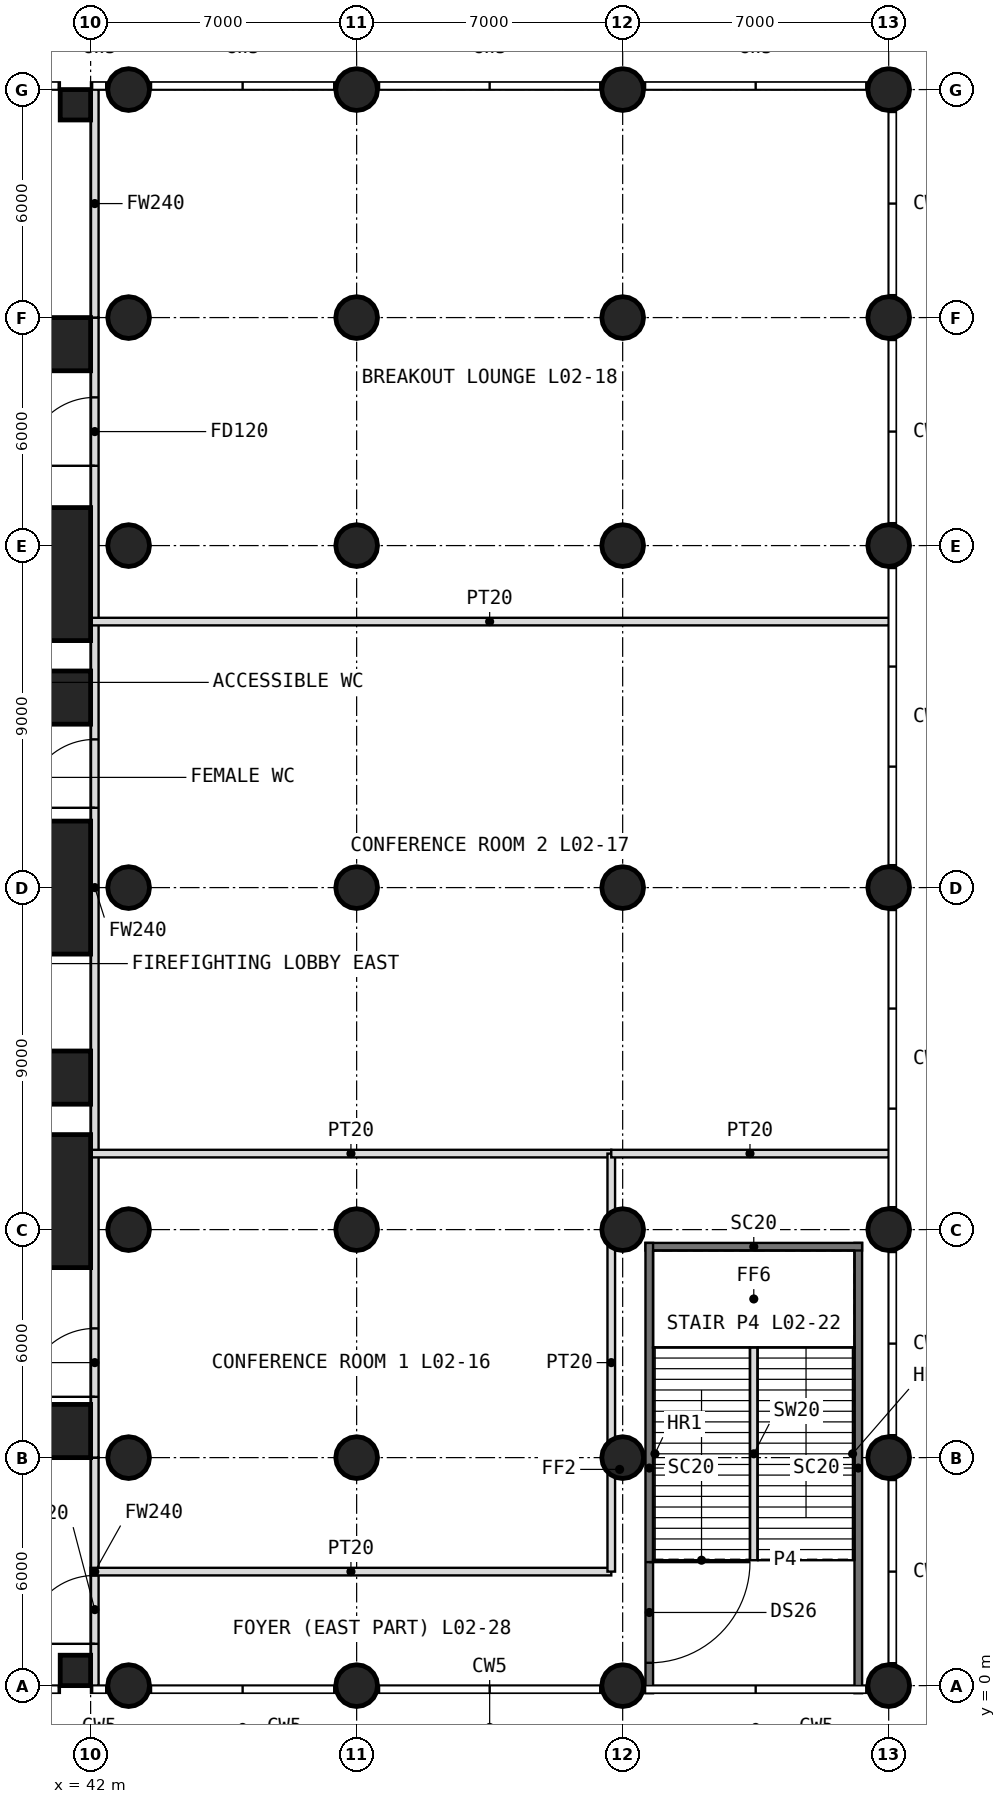
"""IFC4 building model, lengths in metres.
Left out: names, types, materials, properties, quantities, classifications, styles, units other than length and angle.
Written with IfcOpenShell. Run it as: python <this file> out.ifc"""

import sys

from ifc_helpers import new_model, si_unit, direction, frame, frame_2d, origin, origin_2d, place, context, subcontext, project, spatial, rectangle, circle, extrude, element, fill, save


model = new_model("IFC4")
c1 = context("Model", 3, precision=1e-05, world=origin(), true_north=direction((0.0, 1.0)))
c2 = subcontext(c1, "Body", "Model", "MODEL_VIEW")
j1 = project(units=[si_unit("LENGTHUNIT", "METRE"), si_unit("PLANEANGLEUNIT", "RADIAN")], contexts=[c1])
p1 = place(None, origin())
s1 = spatial("IfcSite", under=j1, at=p1, CompositionType="ELEMENT")
p2 = place(p1, origin())
s2 = spatial("IfcBuilding", under=s1, at=p2, CompositionType="ELEMENT")
p3 = place(p2, frame((0.0, 0.0, 11.0)))
s3 = spatial("IfcBuildingStorey", under=s2, at=p3, CompositionType="ELEMENT", Elevation=11.0)
p4 = place(p3, frame((41.6, 0.4, 0.0), z_axis=(0.0, 0.0, 1.0), x_axis=(1.0, 0.0, 0.0)))
e1 = element("IfcColumn", 1, at=p4, inside=s3, PredefinedType="COLUMN", context=c2, shape_type="SweptSolid", body=[
    extrude(rectangle(XDim=0.8, YDim=0.8, at=origin_2d()), origin(), (0.0, 0.0, 1.0), 7.0),
])
for number, where, z_axis, x_axis in (
    (2, (43.0, 0.0, 0.0), (0.0, 0.0, 1.0), (1.0, 0.0, 0.0)),
    (3, (49.0, 0.0, 0.0), (0.0, 0.0, 1.0), (1.0, 0.0, 0.0)),
    (4, (56.0, 0.0, 0.0), (0.0, 0.0, 1.0), (1.0, 0.0, 0.0)),
    (5, (63.0, 0.0, 0.0), (0.0, 0.0, 1.0), (1.0, 0.0, 0.0)),
):
    element("IfcColumn", number, at=place(p3, frame(where, z_axis=z_axis, x_axis=x_axis)), inside=s3, PredefinedType="COLUMN", context=c2, shape_type="SweptSolid", body=[
        extrude(circle(Radius=0.55, at=origin_2d()), origin(), (0.0, 0.0, 1.0), 7.0),
    ])
p5 = place(p3, frame((41.3, 6.7, 0.0), z_axis=(0.0, 0.0, 1.0), x_axis=(1.0, 0.0, 0.0)))
e6 = element("IfcColumn", 6, at=p5, inside=s3, PredefinedType="COLUMN", context=c2, shape_type="SweptSolid", body=[
    extrude(rectangle(XDim=1.4, YDim=1.4, at=origin_2d()), origin(), (0.0, 0.0, 1.0), 7.0),
])
for number, where, z_axis, x_axis in (
    (7, (43.0, 6.0, 0.0), (0.0, 0.0, 1.0), (1.0, 0.0, 0.0)),
    (8, (49.0, 6.0, 0.0), (0.0, 0.0, 1.0), (1.0, 0.0, 0.0)),
    (9, (56.0, 6.0, 0.0), (0.0, 0.0, 1.0), (1.0, 0.0, 0.0)),
    (10, (63.0, 6.0, 0.0), (0.0, 0.0, 1.0), (1.0, 0.0, 0.0)),
):
    element("IfcColumn", number, at=place(p3, frame(where, z_axis=z_axis, x_axis=x_axis)), inside=s3, PredefinedType="COLUMN", context=c2, shape_type="SweptSolid", body=[
        extrude(circle(Radius=0.55, at=origin_2d()), origin(), (0.0, 0.0, 1.0), 7.0),
    ])
p6 = place(p3, frame((40.25, 12.75, 0.0), z_axis=(0.0, 0.0, 1.0), x_axis=(1.0, 0.0, 0.0)))
e11 = element("IfcColumn", 11, at=p6, inside=s3, PredefinedType="COLUMN", context=c2, shape_type="SweptSolid", body=[
    extrude(rectangle(XDim=3.5, YDim=3.5, at=origin_2d()), origin(), (0.0, 0.0, 1.0), 7.0),
])
for number, where, z_axis, x_axis in (
    (12, (43.0, 12.0, 0.0), (0.0, 0.0, 1.0), (1.0, 0.0, 0.0)),
    (13, (49.0, 12.0, 0.0), (0.0, 0.0, 1.0), (1.0, 0.0, 0.0)),
    (14, (56.0, 12.0, 0.0), (0.0, 0.0, 1.0), (1.0, 0.0, 0.0)),
    (15, (63.0, 12.0, 0.0), (0.0, 0.0, 1.0), (1.0, 0.0, 0.0)),
):
    element("IfcColumn", number, at=place(p3, frame(where, z_axis=z_axis, x_axis=x_axis)), inside=s3, PredefinedType="COLUMN", context=c2, shape_type="SweptSolid", body=[
        extrude(circle(Radius=0.55, at=origin_2d()), origin(), (0.0, 0.0, 1.0), 7.0),
    ])
p7 = place(p3, frame((41.3, 16.0, 0.0), z_axis=(0.0, 0.0, 1.0), x_axis=(1.0, 0.0, 0.0)))
e16 = element("IfcColumn", 16, at=p7, inside=s3, PredefinedType="COLUMN", context=c2, shape_type="SweptSolid", body=[
    extrude(rectangle(XDim=1.4, YDim=1.4, at=origin_2d()), origin(), (0.0, 0.0, 1.0), 7.0),
])
p8 = place(p3, frame((40.25, 21.0, 0.0), z_axis=(0.0, 0.0, 1.0), x_axis=(1.0, 0.0, 0.0)))
e17 = element("IfcColumn", 17, at=p8, inside=s3, PredefinedType="COLUMN", context=c2, shape_type="SweptSolid", body=[
    extrude(rectangle(XDim=3.5, YDim=3.5, at=origin_2d()), origin(), (0.0, 0.0, 1.0), 7.0),
])
for number, where, z_axis, x_axis in (
    (18, (43.0, 21.0, 0.0), (0.0, 0.0, 1.0), (1.0, 0.0, 0.0)),
    (19, (49.0, 21.0, 0.0), (0.0, 0.0, 1.0), (1.0, 0.0, 0.0)),
    (20, (56.0, 21.0, 0.0), (0.0, 0.0, 1.0), (1.0, 0.0, 0.0)),
    (21, (63.0, 21.0, 0.0), (0.0, 0.0, 1.0), (1.0, 0.0, 0.0)),
):
    element("IfcColumn", number, at=place(p3, frame(where, z_axis=z_axis, x_axis=x_axis)), inside=s3, PredefinedType="COLUMN", context=c2, shape_type="SweptSolid", body=[
        extrude(circle(Radius=0.55, at=origin_2d()), origin(), (0.0, 0.0, 1.0), 7.0),
    ])
p9 = place(p3, frame((41.3, 26.0, 0.0), z_axis=(0.0, 0.0, 1.0), x_axis=(1.0, 0.0, 0.0)))
e22 = element("IfcColumn", 22, at=p9, inside=s3, PredefinedType="COLUMN", context=c2, shape_type="SweptSolid", body=[
    extrude(rectangle(XDim=1.4, YDim=1.4, at=origin_2d()), origin(), (0.0, 0.0, 1.0), 7.0),
])
for number, where, z_axis, x_axis in (
    (23, (43.0, 30.0, 0.0), (0.0, 0.0, 1.0), (1.0, 0.0, 0.0)),
    (24, (49.0, 30.0, 0.0), (0.0, 0.0, 1.0), (1.0, 0.0, 0.0)),
    (25, (56.0, 30.0, 0.0), (0.0, 0.0, 1.0), (1.0, 0.0, 0.0)),
    (26, (63.0, 30.0, 0.0), (0.0, 0.0, 1.0), (1.0, 0.0, 0.0)),
):
    element("IfcColumn", number, at=place(p3, frame(where, z_axis=z_axis, x_axis=x_axis)), inside=s3, PredefinedType="COLUMN", context=c2, shape_type="SweptSolid", body=[
        extrude(circle(Radius=0.55, at=origin_2d()), origin(), (0.0, 0.0, 1.0), 7.0),
    ])
p10 = place(p3, frame((40.25, 29.25, 0.0), z_axis=(0.0, 0.0, 1.0), x_axis=(1.0, 0.0, 0.0)))
e27 = element("IfcColumn", 27, at=p10, inside=s3, PredefinedType="COLUMN", context=c2, shape_type="SweptSolid", body=[
    extrude(rectangle(XDim=3.5, YDim=3.5, at=origin_2d()), origin(), (0.0, 0.0, 1.0), 7.0),
])
p11 = place(p3, frame((41.3, 35.3, 0.0), z_axis=(0.0, 0.0, 1.0), x_axis=(1.0, 0.0, 0.0)))
e28 = element("IfcColumn", 28, at=p11, inside=s3, PredefinedType="COLUMN", context=c2, shape_type="SweptSolid", body=[
    extrude(rectangle(XDim=1.4, YDim=1.4, at=origin_2d()), origin(), (0.0, 0.0, 1.0), 7.0),
])
for number, where, z_axis, x_axis in (
    (29, (43.0, 36.0, 0.0), (0.0, 0.0, 1.0), (1.0, 0.0, 0.0)),
    (30, (49.0, 36.0, 0.0), (0.0, 0.0, 1.0), (1.0, 0.0, 0.0)),
    (31, (56.0, 36.0, 0.0), (0.0, 0.0, 1.0), (1.0, 0.0, 0.0)),
    (32, (63.0, 36.0, 0.0), (0.0, 0.0, 1.0), (1.0, 0.0, 0.0)),
):
    element("IfcColumn", number, at=place(p3, frame(where, z_axis=z_axis, x_axis=x_axis)), inside=s3, PredefinedType="COLUMN", context=c2, shape_type="SweptSolid", body=[
        extrude(circle(Radius=0.55, at=origin_2d()), origin(), (0.0, 0.0, 1.0), 7.0),
    ])
p12 = place(p3, frame((41.6, 41.6, 0.0), z_axis=(0.0, 0.0, 1.0), x_axis=(1.0, 0.0, 0.0)))
e33 = element("IfcColumn", 33, at=p12, inside=s3, PredefinedType="COLUMN", context=c2, shape_type="SweptSolid", body=[
    extrude(rectangle(XDim=0.8, YDim=0.8, at=origin_2d()), origin(), (0.0, 0.0, 1.0), 7.0),
])
for number, where, z_axis, x_axis in (
    (34, (43.0, 42.0, 0.0), (0.0, 0.0, 1.0), (1.0, 0.0, 0.0)),
    (35, (49.0, 42.0, 0.0), (0.0, 0.0, 1.0), (1.0, 0.0, 0.0)),
    (36, (56.0, 42.0, 0.0), (0.0, 0.0, 1.0), (1.0, 0.0, 0.0)),
    (37, (63.0, 42.0, 0.0), (0.0, 0.0, 1.0), (1.0, 0.0, 0.0)),
):
    element("IfcColumn", number, at=place(p3, frame(where, z_axis=z_axis, x_axis=x_axis)), inside=s3, PredefinedType="COLUMN", context=c2, shape_type="SweptSolid", body=[
        extrude(circle(Radius=0.55, at=origin_2d()), origin(), (0.0, 0.0, 1.0), 7.0),
    ])
p13 = place(p3, frame((62.2, -0.2, -0.3), z_axis=(0.0, 0.0, 1.0), x_axis=(0.0, 1.0, 0.0)))
e38 = element("IfcWall", 38, at=p13, inside=s3, PredefinedType="SOLIDWALL", context=c2, shape_type="SweptSolid", body=[
    extrude(rectangle(XDim=11.85, YDim=0.2, at=frame_2d((5.925, 0.0))), origin(), (0.0, 0.0, 1.0), 7.1),
])
p14 = place(p3, frame((62.3, 11.55, -0.3), z_axis=(0.0, 0.0, 1.0), x_axis=(-1.0, 0.0, 0.0)))
e39 = element("IfcWall", 39, at=p14, inside=s3, PredefinedType="SOLIDWALL", context=c2, shape_type="SweptSolid", body=[
    extrude(rectangle(XDim=5.7, YDim=0.2, at=frame_2d((2.85, 0.0))), origin(), (0.0, 0.0, 1.0), 7.1),
])
p15 = place(p3, frame((56.7, 11.65, -0.3), z_axis=(0.0, 0.0, 1.0), x_axis=(0.0, -1.0, 0.0)))
e40 = element("IfcWall", 40, at=p15, inside=s3, PredefinedType="SOLIDWALL", context=c2, shape_type="SweptSolid", body=[
    extrude(rectangle(XDim=11.85, YDim=0.2, at=frame_2d((5.925, 0.0))), origin(), (0.0, 0.0, 1.0), 7.1),
])
p16 = place(p15, frame((8.4, 0.0, 0.3)))
e41 = element("IfcOpeningElement", 41, at=p16, cuts=e40, PredefinedType="OPENING", context=c2, shape_type="SweptSolid", body=[
    extrude(rectangle(XDim=2.65, YDim=2.4, at=frame_2d((1.325, 1.2))), frame((0.0, 0.11, 0.0), z_axis=(0.0, -1.0, 0.0), x_axis=(1.0, 0.0, 0.0)), (0.0, 0.0, 1.0), 0.22),
])
p17 = place(p3, frame((42.11, 0.0, 0.0), z_axis=(0.0, 0.0, 1.0), x_axis=(0.0, 1.0, 0.0)))
e42 = element("IfcWall", 42, at=p17, inside=s3, PredefinedType="PARTITIONING", context=c2, shape_type="SweptSolid", body=[
    extrude(rectangle(XDim=6.0, YDim=0.2, at=frame_2d((3.0, 0.0))), origin(), (0.0, 0.0, 1.0), 5.98),
])
p18 = place(p17, frame((1.1, 0.0, 0.0)))
e43 = element("IfcOpeningElement", 43, at=p18, cuts=e42, PredefinedType="OPENING", context=c2, shape_type="SweptSolid", body=[
    extrude(rectangle(XDim=1.8, YDim=2.4, at=frame_2d((0.9, 1.2))), frame((0.0, 0.11, 0.0), z_axis=(0.0, -1.0, 0.0), x_axis=(1.0, 0.0, 0.0)), (0.0, 0.0, 1.0), 0.22),
])
p19 = place(p3, frame((42.11, 6.0, 0.0), z_axis=(0.0, 0.0, 1.0), x_axis=(0.0, 1.0, 0.0)))
e44 = element("IfcWall", 44, at=p19, inside=s3, PredefinedType="PARTITIONING", context=c2, shape_type="SweptSolid", body=[
    extrude(rectangle(XDim=30.0, YDim=0.2, at=frame_2d((15.0, 0.0))), origin(), (0.0, 0.0, 1.0), 6.6),
])
p20 = place(p19, frame((1.6, 0.0, 0.0)))
e45 = element("IfcOpeningElement", 45, at=p20, cuts=e44, PredefinedType="OPENING", context=c2, shape_type="SweptSolid", body=[
    extrude(rectangle(XDim=1.8, YDim=2.4, at=frame_2d((0.9, 1.2))), frame((0.0, 0.11, 0.0), z_axis=(0.0, -1.0, 0.0), x_axis=(1.0, 0.0, 0.0)), (0.0, 0.0, 1.0), 0.22),
])
p21 = place(p19, frame((17.1, 0.0, 0.0)))
e46 = element("IfcOpeningElement", 46, at=p21, cuts=e44, PredefinedType="OPENING", context=c2, shape_type="SweptSolid", body=[
    extrude(rectangle(XDim=1.8, YDim=2.4, at=frame_2d((0.9, 1.2))), frame((0.0, 0.11, 0.0), z_axis=(0.0, -1.0, 0.0), x_axis=(1.0, 0.0, 0.0)), (0.0, 0.0, 1.0), 0.22),
])
p22 = place(p19, frame((26.1, 0.0, 0.0)))
e47 = element("IfcOpeningElement", 47, at=p22, cuts=e44, PredefinedType="OPENING", context=c2, shape_type="SweptSolid", body=[
    extrude(rectangle(XDim=1.8, YDim=2.4, at=frame_2d((0.9, 1.2))), frame((0.0, 0.11, 0.0), z_axis=(0.0, -1.0, 0.0), x_axis=(1.0, 0.0, 0.0)), (0.0, 0.0, 1.0), 0.22),
])
p23 = place(p3, frame((42.11, 36.0, 0.0), z_axis=(0.0, 0.0, 1.0), x_axis=(0.0, 1.0, 0.0)))
e48 = element("IfcWall", 48, at=p23, inside=s3, PredefinedType="PARTITIONING", context=c2, shape_type="SweptSolid", body=[
    extrude(rectangle(XDim=6.0, YDim=0.2, at=frame_2d((3.0, 0.0))), origin(), (0.0, 0.0, 1.0), 5.98),
])
for number, where, z_axis, x_axis in (
    (49, (42.0, 3.0, 0.0), (0.0, 0.0, 1.0), (1.0, 0.0, 0.0)),
    (50, (42.0, 14.0, 0.0), (0.0, 0.0, 1.0), (1.0, 0.0, 0.0)),
):
    element("IfcWall", number, at=place(p3, frame(where, z_axis=z_axis, x_axis=x_axis)), inside=s3, PredefinedType="PARTITIONING", context=c2, shape_type="SweptSolid", body=[
        extrude(rectangle(XDim=13.7, YDim=0.2, at=frame_2d((6.85, 0.0))), origin(), (0.0, 0.0, 1.0), 6.6),
    ])
p24 = place(p3, frame((42.0, 28.0, 0.0), z_axis=(0.0, 0.0, 1.0), x_axis=(1.0, 0.0, 0.0)))
e51 = element("IfcWall", 51, at=p24, inside=s3, PredefinedType="PARTITIONING", context=c2, shape_type="SweptSolid", body=[
    extrude(rectangle(XDim=21.0, YDim=0.2, at=frame_2d((10.5, 0.0))), origin(), (0.0, 0.0, 1.0), 6.6),
])
p25 = place(p3, frame((55.7, 3.0, 0.0), z_axis=(0.0, 0.0, 1.0), x_axis=(0.0, 1.0, 0.0)))
e52 = element("IfcWall", 52, at=p25, inside=s3, PredefinedType="PARTITIONING", context=c2, shape_type="SweptSolid", body=[
    extrude(rectangle(XDim=11.0, YDim=0.2, at=frame_2d((5.5, 0.0))), origin(), (0.0, 0.0, 1.0), 5.6),
])
p26 = place(p3, frame((55.7, 14.0, 0.0), z_axis=(0.0, 0.0, 1.0), x_axis=(1.0, 0.0, 0.0)))
e53 = element("IfcWall", 53, at=p26, inside=s3, PredefinedType="PARTITIONING", context=c2, shape_type="SweptSolid", body=[
    extrude(rectangle(XDim=7.3, YDim=0.2, at=frame_2d((3.65, 0.0))), origin(), (0.0, 0.0, 1.0), 6.6),
])
p27 = place(p3, frame((59.45, 3.3, 0.0), z_axis=(0.0, 0.0, 1.0), x_axis=(0.0, 1.0, 0.0)))
e54 = element("IfcWall", 54, at=p27, inside=s3, PredefinedType="PARTITIONING", context=c2, shape_type="SweptSolid", body=[
    extrude(rectangle(XDim=5.6, YDim=0.2, at=frame_2d((2.8, 0.0))), origin(), (0.0, 0.0, 1.0), 7.0),
])
p28 = place(p16, origin())
e55 = element("IfcDoor", 55, at=p28, inside=s3, OperationType="DOUBLE_DOOR_SINGLE_SWING", PredefinedType="DOOR", context=c2, shape_type="SweptSolid", body=[
    extrude(rectangle(XDim=2.65, YDim=2.4, at=frame_2d((1.325, 1.2))), frame((0.0, 0.025, 0.0), z_axis=(0.0, -1.0, 0.0), x_axis=(1.0, 0.0, 0.0)), (0.0, 0.0, 1.0), 0.05),
])
fill(e41, e55)
p29 = place(p18, origin())
e56 = element("IfcDoor", 56, at=p29, inside=s3, OperationType="DOUBLE_DOOR_SINGLE_SWING", PredefinedType="DOOR", context=c2, shape_type="SweptSolid", body=[
    extrude(rectangle(XDim=1.8, YDim=2.4, at=frame_2d((0.9, 1.2))), frame((0.0, 0.025, 0.0), z_axis=(0.0, -1.0, 0.0), x_axis=(1.0, 0.0, 0.0)), (0.0, 0.0, 1.0), 0.05),
])
fill(e43, e56)
p30 = place(p20, origin())
e57 = element("IfcDoor", 57, at=p30, inside=s3, OperationType="DOUBLE_DOOR_SINGLE_SWING", PredefinedType="DOOR", context=c2, shape_type="SweptSolid", body=[
    extrude(rectangle(XDim=1.8, YDim=2.4, at=frame_2d((0.9, 1.2))), frame((0.0, 0.025, 0.0), z_axis=(0.0, -1.0, 0.0), x_axis=(1.0, 0.0, 0.0)), (0.0, 0.0, 1.0), 0.05),
])
fill(e45, e57)
p31 = place(p21, origin())
e58 = element("IfcDoor", 58, at=p31, inside=s3, OperationType="DOUBLE_DOOR_SINGLE_SWING", PredefinedType="DOOR", context=c2, shape_type="SweptSolid", body=[
    extrude(rectangle(XDim=1.8, YDim=2.4, at=frame_2d((0.9, 1.2))), frame((0.0, 0.025, 0.0), z_axis=(0.0, -1.0, 0.0), x_axis=(1.0, 0.0, 0.0)), (0.0, 0.0, 1.0), 0.05),
])
fill(e46, e58)
p32 = place(p22, origin())
e59 = element("IfcDoor", 59, at=p32, inside=s3, OperationType="DOUBLE_DOOR_SINGLE_SWING", PredefinedType="DOOR", context=c2, shape_type="SweptSolid", body=[
    extrude(rectangle(XDim=1.8, YDim=2.4, at=frame_2d((0.9, 1.2))), frame((0.0, 0.025, 0.0), z_axis=(0.0, -1.0, 0.0), x_axis=(1.0, 0.0, 0.0)), (0.0, 0.0, 1.0), 0.05),
])
fill(e47, e59)
save(model, sys.argv[1])
